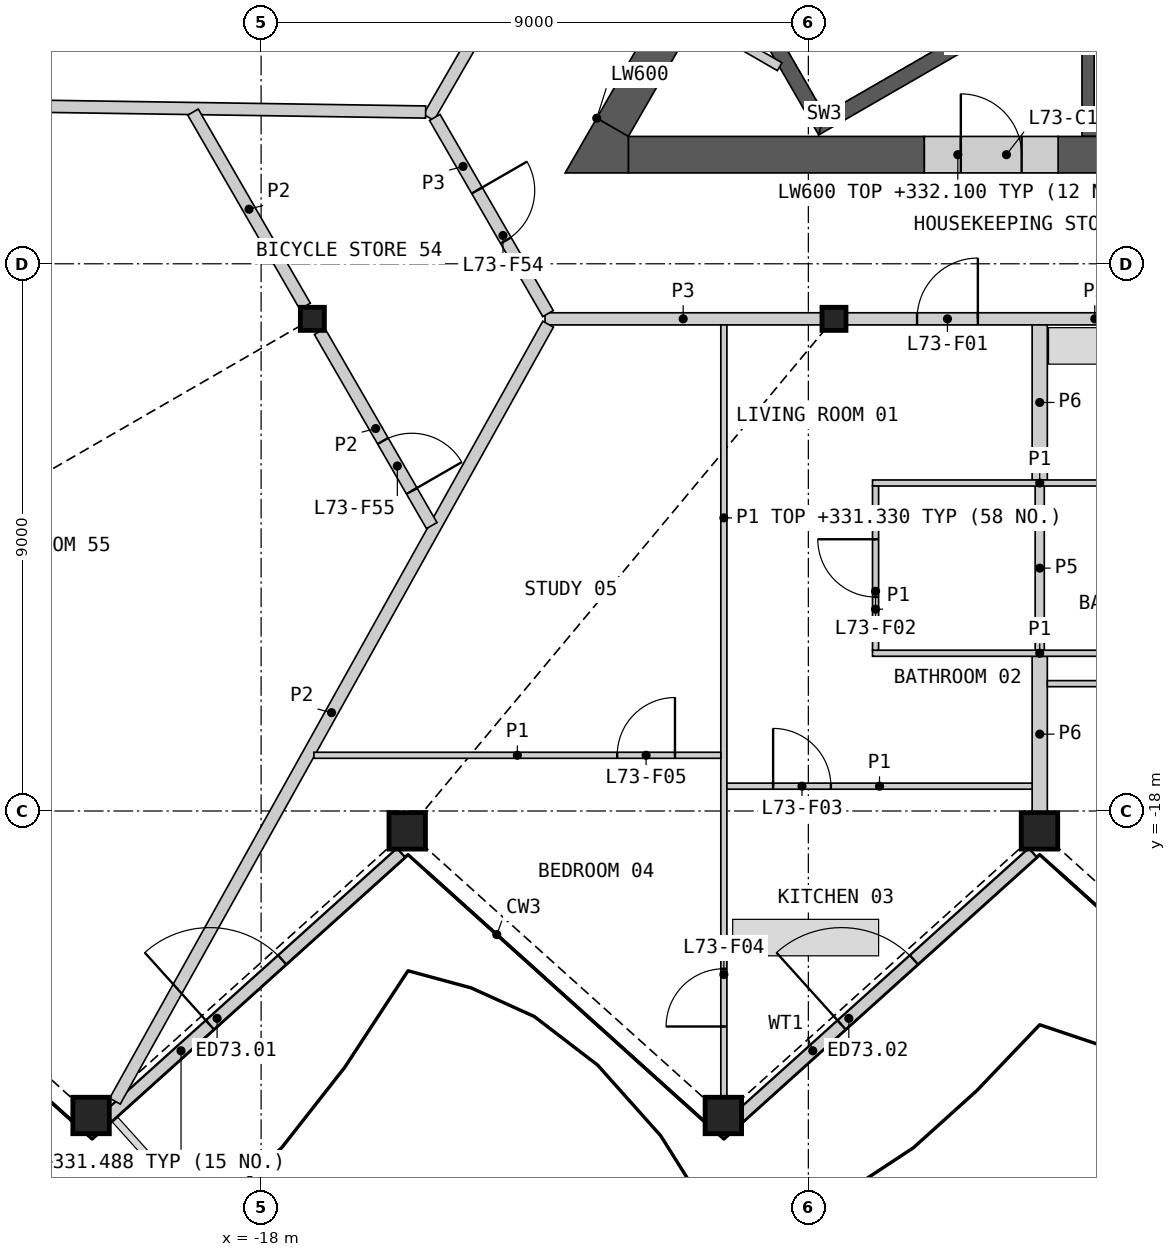
"""IFC4 building model, lengths in metres.
Left out: names, types, materials, properties, quantities, classifications, styles, units other than length and angle.
Written with IfcOpenShell. Run it as: python <this file> out.ifc"""

import sys

from ifc_helpers import new_model, si_unit, direction, frame, frame_2d, origin, origin_2d, place, context, subcontext, project, spatial, polyline, rectangle, hollow_rectangle, i_section, outline, extrude, element, fill, save


model = new_model("IFC4")
c1 = context("Model", 3, precision=1e-05, world=origin(), true_north=direction((0.0, 1.0)))
c2 = subcontext(c1, "Body", "Model", "MODEL_VIEW")
j1 = project(units=[si_unit("LENGTHUNIT", "METRE"), si_unit("PLANEANGLEUNIT", "RADIAN")], contexts=[c1])
p1 = place(None, origin())
s1 = spatial("IfcSite", under=j1, at=p1, CompositionType="ELEMENT")
p2 = place(p1, origin())
s2 = spatial("IfcBuilding", under=s1, at=p2, CompositionType="ELEMENT")
p3 = place(p2, frame((0.0, 0.0, 329.0)))
s3 = spatial("IfcBuildingStorey", under=s2, at=p3, CompositionType="ELEMENT", Elevation=329.0)
for number, where, z_axis, x_axis in (
    (1, (-20.796, -23.008, 0.0), (0.0, 0.0, 1.0), (1.0, 0.0, 0.0)),
    (2, (-15.597, -18.327, 0.0), (0.0, 0.0, 1.0), (1.0, 0.0, 0.0)),
    (3, (-10.398, -23.008, 0.0), (0.0, 0.0, 1.0), (1.0, 0.0, 0.0)),
    (4, (-5.199, -18.327, 0.0), (0.0, 0.0, 1.0), (1.0, 0.0, 0.0)),
):
    element("IfcColumn", number, at=place(p3, frame(where, z_axis=z_axis, x_axis=x_axis)), inside=s3, PredefinedType="COLUMN", context=c2, shape_type="SweptSolid", body=[
        extrude(hollow_rectangle(XDim=0.6, YDim=0.6, WallThickness=0.04, at=origin_2d()), origin(), (0.0, 0.0, 1.0), 3.4),
    ])
for number, where, z_axis, x_axis in (
    (5, (-17.157, -9.906, 0.0), (0.0, 0.0, 1.0), (1.0, 0.0, 0.0)),
    (6, (-8.578, -9.906, 0.0), (0.0, 0.0, 1.0), (1.0, 0.0, 0.0)),
):
    element("IfcColumn", number, at=place(p3, frame(where, z_axis=z_axis, x_axis=x_axis)), inside=s3, PredefinedType="COLUMN", context=c2, shape_type="SweptSolid", body=[
        extrude(i_section(OverallWidth=0.396, OverallDepth=0.381, WebThickness=0.019, FlangeThickness=0.03, at=origin_2d()), origin(), (0.0, 0.0, 1.0), 3.4),
    ])
p4 = place(p3, frame((-20.523, -23.031, 0.0), z_axis=(0.0, 0.0, 1.0), x_axis=(0.743138937876, 0.669137145145, 0.0)))
e7 = element("IfcWall", 7, at=p4, inside=s3, PredefinedType="SOLIDWALL", context=c2, shape_type="SweptSolid", body=[
    extrude(rectangle(XDim=6.493, YDim=0.2, at=frame_2d((3.246, 0.0))), origin(), (0.0, 0.0, 1.0), 2.488),
])
p5 = place(p4, frame((2.261, 0.0, 0.0)))
e8 = element("IfcOpeningElement", 8, at=p5, cuts=e7, PredefinedType="OPENING", context=c2, shape_type="SweptSolid", body=[
    extrude(rectangle(XDim=1.6, YDim=2.25, at=frame_2d((0.8, 1.125))), frame((0.0, 0.11, 0.0), z_axis=(0.0, -1.0, 0.0), x_axis=(1.0, 0.0, 0.0)), (0.0, 0.0, 1.0), 0.22),
])
p6 = place(p3, frame((-10.134, -23.031, 0.0), z_axis=(0.0, 0.0, 1.0), x_axis=(0.743138937876, 0.669137145145, 0.0)))
e9 = element("IfcWall", 9, at=p6, inside=s3, PredefinedType="SOLIDWALL", context=c2, shape_type="SweptSolid", body=[
    extrude(rectangle(XDim=6.493, YDim=0.2, at=frame_2d((3.246, 0.0))), origin(), (0.0, 0.0, 1.0), 2.488),
])
p7 = place(p6, frame((2.261, 0.0, 0.0)))
e10 = element("IfcOpeningElement", 10, at=p7, cuts=e9, PredefinedType="OPENING", context=c2, shape_type="SweptSolid", body=[
    extrude(rectangle(XDim=1.6, YDim=2.25, at=frame_2d((0.8, 1.125))), frame((0.0, 0.11, 0.0), z_axis=(0.0, -1.0, 0.0), x_axis=(1.0, 0.0, 0.0)), (0.0, 0.0, 1.0), 0.22),
])
p8 = place(p3, origin())
e11 = element("IfcWall", 11, at=p8, inside=s3, PredefinedType="SHEAR", context=c2, shape_type="SweptSolid", body=[
    extrude(outline(polyline([(4.5, -4.4), (4.5, -6.906), (-4.5, -6.906), (-4.5, -4.4), (-4.3, -4.4), (-4.3, -6.7), (-2.3, -6.7), (-2.3, -4.4), (-2.1, -4.4), (-2.1, -6.7), (-0.1, -6.7), (-0.1, -4.4), (0.1, -4.4), (0.1, -6.7), (2.1, -6.7), (2.1, -4.4), (2.3, -4.4), (2.3, -6.7), (4.3, -6.7), (4.3, -4.4), (4.5, -4.4)])), origin(), (0.0, 0.0, 1.0), 3.1),
])
p9 = place(p3, origin())
e12 = element("IfcWall", 12, at=p9, inside=s3, PredefinedType="SHEAR", context=c2, shape_type="SweptSolid", body=[
    extrude(outline(polyline([(-10.374, -4.206), (-8.83, -6.881), (-8.738, -6.539), (-10.032, -4.298), (-10.374, -4.206)])), origin(), (0.0, 0.0, 1.0), 3.1),
])
p10 = place(p3, origin())
e13 = element("IfcWall", 13, at=p10, inside=s3, PredefinedType="SHEAR", context=c2, shape_type="SweptSolid", body=[
    extrude(outline(polyline([(-8.738, -6.539), (-8.83, -6.881), (-3.763, -3.956), (-3.888, -3.739), (-8.738, -6.539)])), origin(), (0.0, 0.0, 1.0), 3.1),
])
p11 = place(p3, frame((-10.842, -4.967, 0.0), z_axis=(0.0, 0.0, 1.0), x_axis=(0.866098216386, -0.499873863663, 0.0)))
e14 = element("IfcWall", 14, at=p11, inside=s3, PredefinedType="PARTITIONING", context=c2, shape_type="SweptSolid", body=[
    extrude(rectangle(XDim=1.582, YDim=0.15, at=frame_2d((0.791, 0.0))), origin(), (0.0, 0.0, 1.0), 3.1),
])
p12 = place(p3, frame((-4.892, -7.206, 0.0), z_axis=(0.0, 0.0, 1.0), x_axis=(1.0, 0.0, 0.0)))
e15 = element("IfcWall", 15, at=p12, inside=s3, PredefinedType="SHEAR", context=c2, shape_type="SweptSolid", body=[
    extrude(rectangle(XDim=16.853, YDim=0.6, at=frame_2d((8.426, 0.0))), origin(), (0.0, 0.0, 1.0), 3.1),
])
p13 = place(p3, frame((-11.961, -7.206, 0.0), z_axis=(0.0, 0.0, 1.0), x_axis=(1.0, 0.0, 0.0)))
e16 = element("IfcWall", 16, at=p13, inside=s3, PredefinedType="SHEAR", context=c2, shape_type="SweptSolid", body=[
    extrude(rectangle(XDim=4.868, YDim=0.6, at=frame_2d((2.434, 0.0))), origin(), (0.0, 0.0, 1.0), 3.1),
])
p14 = place(p3, frame((-9.941, -2.807, 0.0), z_axis=(0.0, 0.0, 1.0), x_axis=(-0.500020646047, -0.866013483456, 0.0)))
e17 = element("IfcWall", 17, at=p14, inside=s3, PredefinedType="SHEAR", context=c2, shape_type="SweptSolid", body=[
    extrude(rectangle(XDim=4.559, YDim=0.6, at=frame_2d((2.28, 0.0))), origin(), (0.0, 0.0, 1.0), 3.1),
])
p15 = place(p3, origin())
e18 = element("IfcWall", 18, at=p15, inside=s3, PredefinedType="SHEAR", context=c2, shape_type="SweptSolid", body=[
    extrude(outline(polyline([(-12.48, -6.606), (-11.961, -6.906), (-11.961, -7.506), (-13.0, -7.506), (-12.48, -6.606)])), origin(), (0.0, 0.0, 1.0), 3.1),
])
p16 = place(p3, frame((-7.092, -7.206, 0.0), z_axis=(0.0, 0.0, 1.0), x_axis=(1.0, 0.0, 0.0)))
e19 = element("IfcWall", 19, at=p16, inside=s3, PredefinedType="SHEAR", context=c2, shape_type="SweptSolid", body=[
    extrude(rectangle(XDim=2.2, YDim=0.6, at=frame_2d((1.1, 0.0))), origin(), (0.0, 0.0, 1.0), 3.1),
])
p17 = place(p16, frame((0.6, 0.0, 0.0)))
e20 = element("IfcOpeningElement", 20, at=p17, cuts=e19, PredefinedType="OPENING", context=c2, shape_type="SweptSolid", body=[
    extrude(rectangle(XDim=1.0, YDim=2.1, at=frame_2d((0.5, 1.05))), frame((0.0, 0.31, 0.0), z_axis=(0.0, -1.0, 0.0), x_axis=(1.0, 0.0, 0.0)), (0.0, 0.0, 1.0), 0.62),
])
p18 = place(p3, frame((-8.371, -9.906, 0.0), z_axis=(0.0, 0.0, 1.0), x_axis=(1.0, 0.0, 0.0)))
e21 = element("IfcWall", 21, at=p18, inside=s3, PredefinedType="PARTITIONING", context=c2, shape_type="SweptSolid", body=[
    extrude(rectangle(XDim=8.163, YDim=0.2, at=frame_2d((4.082, 0.0))), origin(), (0.0, 0.0, 1.0), 3.1),
])
p19 = place(p18, frame((1.159, 0.0, 0.0)))
e22 = element("IfcOpeningElement", 22, at=p19, cuts=e21, PredefinedType="OPENING", context=c2, shape_type="SweptSolid", body=[
    extrude(rectangle(XDim=1.0, YDim=2.1, at=frame_2d((0.5, 1.05))), frame((0.0, 0.11, 0.0), z_axis=(0.0, -1.0, 0.0), x_axis=(1.0, 0.0, 0.0)), (0.0, 0.0, 1.0), 0.22),
])
p20 = place(p18, frame((6.327, 0.0, 0.0)))
e23 = element("IfcOpeningElement", 23, at=p20, cuts=e21, PredefinedType="OPENING", context=c2, shape_type="SweptSolid", body=[
    extrude(rectangle(XDim=1.0, YDim=2.1, at=frame_2d((0.5, 1.05))), frame((0.0, 0.11, 0.0), z_axis=(0.0, -1.0, 0.0), x_axis=(1.0, 0.0, 0.0)), (0.0, 0.0, 1.0), 0.22),
])
p21 = place(p3, frame((-13.331, -9.906, 0.0), z_axis=(0.0, 0.0, 1.0), x_axis=(1.0, 0.0, 0.0)))
e24 = element("IfcWall", 24, at=p21, inside=s3, PredefinedType="PARTITIONING", context=c2, shape_type="SweptSolid", body=[
    extrude(rectangle(XDim=4.545, YDim=0.2, at=frame_2d((2.272, 0.0))), origin(), (0.0, 0.0, 1.0), 3.1),
])
p22 = place(p3, frame((-15.244, -6.592, 0.0), z_axis=(0.0, 0.0, 1.0), x_axis=(0.49999094734, 0.866030630277, 0.0)))
e25 = element("IfcWall", 25, at=p22, inside=s3, PredefinedType="PARTITIONING", context=c2, shape_type="SweptSolid", body=[
    extrude(rectangle(XDim=4.513, YDim=0.2, at=frame_2d((2.256, 0.0))), origin(), (0.0, 0.0, 1.0), 3.1),
])
p23 = place(p3, frame((-15.144, -6.592, 0.0), z_axis=(0.0, 0.0, 1.0), x_axis=(0.499958791762, -0.866049194065, 0.0)))
e26 = element("IfcWall", 26, at=p23, inside=s3, PredefinedType="PARTITIONING", context=c2, shape_type="SweptSolid", body=[
    extrude(rectangle(XDim=3.726, YDim=0.2, at=frame_2d((1.863, 0.0))), origin(), (0.0, 0.0, 1.0), 3.1),
])
p24 = place(p23, frame((1.388, 0.0, 0.0)))
e27 = element("IfcOpeningElement", 27, at=p24, cuts=e26, PredefinedType="OPENING", context=c2, shape_type="SweptSolid", body=[
    extrude(rectangle(XDim=0.95, YDim=2.1, at=frame_2d((0.475, 1.05))), frame((0.0, 0.11, 0.0), z_axis=(0.0, -1.0, 0.0), x_axis=(1.0, 0.0, 0.0)), (0.0, 0.0, 1.0), 0.22),
])
p25 = place(p3, frame((-5.195, -12.556, 0.0), z_axis=(0.0, 0.0, 1.0), x_axis=(0.0, 1.0, 0.0)))
e28 = element("IfcWall", 28, at=p25, inside=s3, PredefinedType="PARTITIONING", context=c2, shape_type="SweptSolid", body=[
    extrude(rectangle(XDim=2.55, YDim=0.25, at=frame_2d((1.275, 0.0))), origin(), (0.0, 0.0, 1.0), 2.33),
])
p26 = place(p3, frame((-5.195, -18.017, 0.0), z_axis=(0.0, 0.0, 1.0), x_axis=(0.0, 1.0, 0.0)))
e29 = element("IfcWall", 29, at=p26, inside=s3, PredefinedType="PARTITIONING", context=c2, shape_type="SweptSolid", body=[
    extrude(rectangle(XDim=2.561, YDim=0.25, at=frame_2d((1.281, 0.0))), origin(), (0.0, 0.0, 1.0), 2.33),
])
p27 = place(p3, frame((-20.404, -22.772, 0.0), z_axis=(0.0, 0.0, 1.0), x_axis=(0.486917529285, 0.873447949036, 0.0)))
e30 = element("IfcWall", 30, at=p27, inside=s3, PredefinedType="PARTITIONING", context=c2, shape_type="SweptSolid", body=[
    extrude(rectangle(XDim=14.631, YDim=0.2, at=frame_2d((7.315, 0.0))), origin(), (0.0, 0.0, 1.0), 2.33),
])
p28 = place(p3, frame((-30.014, -6.282, 0.0), z_axis=(0.0, 0.0, 1.0), x_axis=(0.99988686643, -0.015041753265, 0.0)))
e31 = element("IfcWall", 31, at=p28, inside=s3, PredefinedType="PARTITIONING", context=c2, shape_type="SweptSolid", body=[
    extrude(rectangle(XDim=14.721, YDim=0.2, at=frame_2d((7.361, 0.0))), origin(), (0.0, 0.0, 1.0), 2.33),
])
p29 = place(p3, frame((-17.037, -10.113, 0.0), z_axis=(0.0, 0.0, 1.0), x_axis=(0.50002820729, -0.866009117685, 0.0)))
e32 = element("IfcWall", 32, at=p29, inside=s3, PredefinedType="PARTITIONING", context=c2, shape_type="SweptSolid", body=[
    extrude(rectangle(XDim=3.686, YDim=0.2, at=frame_2d((1.843, 0.0))), origin(), (0.0, 0.0, 1.0), 2.33),
])
p30 = place(p29, frame((2.08, 0.0, 0.0)))
e33 = element("IfcOpeningElement", 33, at=p30, cuts=e32, PredefinedType="OPENING", context=c2, shape_type="SweptSolid", body=[
    extrude(rectangle(XDim=0.95, YDim=2.1, at=frame_2d((0.475, 1.05))), frame((0.0, 0.11, 0.0), z_axis=(0.0, -1.0, 0.0), x_axis=(1.0, 0.0, 0.0)), (0.0, 0.0, 1.0), 0.22),
])
p31 = place(p3, frame((-19.12, -6.506, 0.0), z_axis=(0.0, 0.0, 1.0), x_axis=(0.499978535015, -0.866037796245, 0.0)))
e34 = element("IfcWall", 34, at=p31, inside=s3, PredefinedType="PARTITIONING", context=c2, shape_type="SweptSolid", body=[
    extrude(rectangle(XDim=3.686, YDim=0.2, at=frame_2d((1.843, 0.0))), origin(), (0.0, 0.0, 1.0), 2.33),
])
p32 = place(p3, frame((-5.195, -15.356, 0.0), z_axis=(0.0, 0.0, 1.0), x_axis=(0.0, 1.0, 0.0)))
e35 = element("IfcWall", 35, at=p32, inside=s3, PredefinedType="PLUMBINGWALL", context=c2, shape_type="SweptSolid", body=[
    extrude(rectangle(XDim=2.7, YDim=0.15, at=frame_2d((1.35, 0.0))), origin(), (0.0, 0.0, 1.0), 2.33),
])
p33 = place(p3, frame((-10.389, -22.698, 0.0), z_axis=(0.0, 0.0, 1.0), x_axis=(0.0, 1.0, 0.0)))
e36 = element("IfcWall", 36, at=p33, inside=s3, PredefinedType="PARTITIONING", context=c2, shape_type="SweptSolid", body=[
    extrude(rectangle(XDim=12.692, YDim=0.1, at=frame_2d((6.346, 0.0))), origin(), (0.0, 0.0, 1.0), 2.33),
])
p34 = place(p33, frame((1.153, 0.0, 0.0)))
e37 = element("IfcOpeningElement", 37, at=p34, cuts=e36, PredefinedType="OPENING", context=c2, shape_type="SweptSolid", body=[
    extrude(rectangle(XDim=0.95, YDim=2.1, at=frame_2d((0.475, 1.05))), frame((0.0, 0.06, 0.0), z_axis=(0.0, -1.0, 0.0), x_axis=(1.0, 0.0, 0.0)), (0.0, 0.0, 1.0), 0.12),
])
p35 = place(p3, frame((-23.361, -6.295, 0.0), z_axis=(0.0, 0.0, 1.0), x_axis=(0.499987686533, 0.866032512851, 0.0)))
e38 = element("IfcWall", 38, at=p35, inside=s3, PredefinedType="PARTITIONING", context=c2, shape_type="SweptSolid", body=[
    extrude(rectangle(XDim=6.693, YDim=0.1, at=frame_2d((3.347, 0.0))), origin(), (0.0, 0.0, 1.0), 2.33),
])
p36 = place(p35, frame((3.275, 0.0, 0.0)))
e39 = element("IfcOpeningElement", 39, at=p36, cuts=e38, PredefinedType="OPENING", context=c2, shape_type="SweptSolid", body=[
    extrude(rectangle(XDim=0.95, YDim=2.1, at=frame_2d((0.475, 1.05))), frame((0.0, 0.06, 0.0), z_axis=(0.0, -1.0, 0.0), x_axis=(1.0, 0.0, 0.0)), (0.0, 0.0, 1.0), 0.12),
])
p37 = place(p3, frame((-17.132, -17.084, 0.0), z_axis=(0.0, 0.0, 1.0), x_axis=(1.0, 0.0, 0.0)))
e40 = element("IfcWall", 40, at=p37, inside=s3, PredefinedType="PARTITIONING", context=c2, shape_type="SweptSolid", body=[
    extrude(rectangle(XDim=6.693, YDim=0.1, at=frame_2d((3.346, 0.0))), origin(), (0.0, 0.0, 1.0), 2.33),
])
p38 = place(p37, frame((4.989, 0.0, 0.0)))
e41 = element("IfcOpeningElement", 41, at=p38, cuts=e40, PredefinedType="OPENING", context=c2, shape_type="SweptSolid", body=[
    extrude(rectangle(XDim=0.95, YDim=2.1, at=frame_2d((0.475, 1.05))), frame((0.0, 0.06, 0.0), z_axis=(0.0, -1.0, 0.0), x_axis=(1.0, 0.0, 0.0)), (0.0, 0.0, 1.0), 0.12),
])
p39 = place(p3, frame((-7.945, -12.606, 0.0), z_axis=(0.0, 0.0, 1.0), x_axis=(1.0, 0.0, 0.0)))
e42 = element("IfcWall", 42, at=p39, inside=s3, PredefinedType="PARTITIONING", context=c2, shape_type="SweptSolid", body=[
    extrude(rectangle(XDim=5.5, YDim=0.1, at=frame_2d((2.75, 0.0))), origin(), (0.0, 0.0, 1.0), 2.33),
])
p40 = place(p39, frame((4.3, 0.0, 0.0)))
e43 = element("IfcOpeningElement", 43, at=p40, cuts=e42, PredefinedType="OPENING", context=c2, shape_type="SweptSolid", body=[
    extrude(rectangle(XDim=0.95, YDim=2.1, at=frame_2d((0.475, 1.05))), frame((0.0, 0.06, 0.0), z_axis=(0.0, -1.0, 0.0), x_axis=(1.0, 0.0, 0.0)), (0.0, 0.0, 1.0), 0.12),
])
p41 = place(p3, frame((-7.945, -15.406, 0.0), z_axis=(0.0, 0.0, 1.0), x_axis=(1.0, 0.0, 0.0)))
e44 = element("IfcWall", 44, at=p41, inside=s3, PredefinedType="PARTITIONING", context=c2, shape_type="SweptSolid", body=[
    extrude(rectangle(XDim=5.5, YDim=0.1, at=frame_2d((2.75, 0.0))), origin(), (0.0, 0.0, 1.0), 2.33),
])
p42 = place(p3, frame((-10.339, -17.592, 0.0), z_axis=(0.0, 0.0, 1.0), x_axis=(1.0, 0.0, 0.0)))
e45 = element("IfcWall", 45, at=p42, inside=s3, PredefinedType="PARTITIONING", context=c2, shape_type="SweptSolid", body=[
    extrude(rectangle(XDim=5.02, YDim=0.1, at=frame_2d((2.51, 0.0))), origin(), (0.0, 0.0, 1.0), 2.33),
])
p43 = place(p42, frame((0.76, 0.0, 0.0)))
e46 = element("IfcOpeningElement", 46, at=p43, cuts=e45, PredefinedType="OPENING", context=c2, shape_type="SweptSolid", body=[
    extrude(rectangle(XDim=0.95, YDim=2.1, at=frame_2d((0.475, 1.05))), frame((0.0, 0.06, 0.0), z_axis=(0.0, -1.0, 0.0), x_axis=(1.0, 0.0, 0.0)), (0.0, 0.0, 1.0), 0.12),
])
p44 = place(p3, frame((-5.07, -15.906, 0.0), z_axis=(0.0, 0.0, 1.0), x_axis=(1.0, 0.0, 0.0)))
e47 = element("IfcWall", 47, at=p44, inside=s3, PredefinedType="PARTITIONING", context=c2, shape_type="SweptSolid", body=[
    extrude(rectangle(XDim=2.825, YDim=0.1, at=frame_2d((1.413, 0.0))), origin(), (0.0, 0.0, 1.0), 2.33),
])
p45 = place(p44, frame((1.625, 0.0, 0.0)))
e48 = element("IfcOpeningElement", 48, at=p45, cuts=e47, PredefinedType="OPENING", context=c2, shape_type="SweptSolid", body=[
    extrude(rectangle(XDim=0.95, YDim=2.1, at=frame_2d((0.475, 1.05))), frame((0.0, 0.06, 0.0), z_axis=(0.0, -1.0, 0.0), x_axis=(1.0, 0.0, 0.0)), (0.0, 0.0, 1.0), 0.12),
])
p46 = place(p3, frame((-7.895, -15.356, 0.0), z_axis=(0.0, 0.0, 1.0), x_axis=(0.0, 1.0, 0.0)))
e49 = element("IfcWall", 49, at=p46, inside=s3, PredefinedType="PARTITIONING", context=c2, shape_type="SweptSolid", body=[
    extrude(rectangle(XDim=2.7, YDim=0.1, at=frame_2d((1.35, 0.0))), origin(), (0.0, 0.0, 1.0), 2.33),
])
p47 = place(p46, frame((0.875, 0.0, 0.0)))
e50 = element("IfcOpeningElement", 50, at=p47, cuts=e49, PredefinedType="OPENING", context=c2, shape_type="SweptSolid", body=[
    extrude(rectangle(XDim=0.95, YDim=2.1, at=frame_2d((0.475, 1.05))), frame((0.0, 0.06, 0.0), z_axis=(0.0, -1.0, 0.0), x_axis=(1.0, 0.0, 0.0)), (0.0, 0.0, 1.0), 0.12),
])
p48 = place(p5, origin())
e51 = element("IfcDoor", 51, at=p48, inside=s3, OperationType="DOUBLE_DOOR_SINGLE_SWING", PredefinedType="DOOR", context=c2, shape_type="SweptSolid", body=[
    extrude(rectangle(XDim=1.6, YDim=2.25, at=frame_2d((0.8, 1.125))), frame((0.0, 0.025, 0.0), z_axis=(0.0, -1.0, 0.0), x_axis=(1.0, 0.0, 0.0)), (0.0, 0.0, 1.0), 0.05),
])
fill(e8, e51)
p49 = place(p7, origin())
e52 = element("IfcDoor", 52, at=p49, inside=s3, OperationType="DOUBLE_DOOR_SINGLE_SWING", PredefinedType="DOOR", context=c2, shape_type="SweptSolid", body=[
    extrude(rectangle(XDim=1.6, YDim=2.25, at=frame_2d((0.8, 1.125))), frame((0.0, 0.025, 0.0), z_axis=(0.0, -1.0, 0.0), x_axis=(1.0, 0.0, 0.0)), (0.0, 0.0, 1.0), 0.05),
])
fill(e10, e52)
p50 = place(p17, origin())
e53 = element("IfcDoor", 53, at=p50, inside=s3, OperationType="SINGLE_SWING_LEFT", PredefinedType="DOOR", context=c2, shape_type="SweptSolid", body=[
    extrude(rectangle(XDim=1.0, YDim=2.1, at=frame_2d((0.5, 1.05))), frame((0.0, 0.055, 0.0), z_axis=(0.0, -1.0, 0.0), x_axis=(1.0, 0.0, 0.0)), (0.0, 0.0, 1.0), 0.05),
])
fill(e20, e53)
p51 = place(p19, origin())
e54 = element("IfcDoor", 54, at=p51, inside=s3, OperationType="SINGLE_SWING_RIGHT", PredefinedType="DOOR", context=c2, shape_type="SweptSolid", body=[
    extrude(rectangle(XDim=1.0, YDim=2.1, at=frame_2d((0.5, 1.05))), frame((0.0, 0.025, 0.0), z_axis=(0.0, -1.0, 0.0), x_axis=(1.0, 0.0, 0.0)), (0.0, 0.0, 1.0), 0.05),
])
fill(e22, e54)
p52 = place(p47, origin())
e55 = element("IfcDoor", 55, at=p52, inside=s3, OperationType="SINGLE_SWING_RIGHT", PredefinedType="DOOR", context=c2, shape_type="SweptSolid", body=[
    extrude(rectangle(XDim=0.95, YDim=2.1, at=frame_2d((0.475, 1.05))), frame((0.0, 0.025, 0.0), z_axis=(0.0, -1.0, 0.0), x_axis=(1.0, 0.0, 0.0)), (0.0, 0.0, 1.0), 0.05),
])
fill(e50, e55)
p53 = place(p43, origin())
e56 = element("IfcDoor", 56, at=p53, inside=s3, OperationType="SINGLE_SWING_LEFT", PredefinedType="DOOR", context=c2, shape_type="SweptSolid", body=[
    extrude(rectangle(XDim=0.95, YDim=2.1, at=frame_2d((0.475, 1.05))), frame((0.0, 0.025, 0.0), z_axis=(0.0, -1.0, 0.0), x_axis=(1.0, 0.0, 0.0)), (0.0, 0.0, 1.0), 0.05),
])
fill(e46, e56)
p54 = place(p34, origin())
e57 = element("IfcDoor", 57, at=p54, inside=s3, OperationType="SINGLE_SWING_LEFT", PredefinedType="DOOR", context=c2, shape_type="SweptSolid", body=[
    extrude(rectangle(XDim=0.95, YDim=2.1, at=frame_2d((0.475, 1.05))), frame((0.0, 0.025, 0.0), z_axis=(0.0, -1.0, 0.0), x_axis=(1.0, 0.0, 0.0)), (0.0, 0.0, 1.0), 0.05),
])
fill(e37, e57)
p55 = place(p38, origin())
e58 = element("IfcDoor", 58, at=p55, inside=s3, OperationType="SINGLE_SWING_RIGHT", PredefinedType="DOOR", context=c2, shape_type="SweptSolid", body=[
    extrude(rectangle(XDim=0.95, YDim=2.1, at=frame_2d((0.475, 1.05))), frame((0.0, 0.025, 0.0), z_axis=(0.0, -1.0, 0.0), x_axis=(1.0, 0.0, 0.0)), (0.0, 0.0, 1.0), 0.05),
])
fill(e41, e58)
p56 = place(p24, origin())
e59 = element("IfcDoor", 59, at=p56, inside=s3, OperationType="SINGLE_SWING_LEFT", PredefinedType="DOOR", context=c2, shape_type="SweptSolid", body=[
    extrude(rectangle(XDim=0.95, YDim=2.1, at=frame_2d((0.475, 1.05))), frame((0.0, 0.025, 0.0), z_axis=(0.0, -1.0, 0.0), x_axis=(1.0, 0.0, 0.0)), (0.0, 0.0, 1.0), 0.05),
])
fill(e27, e59)
p57 = place(p30, origin())
e60 = element("IfcDoor", 60, at=p57, inside=s3, OperationType="SINGLE_SWING_RIGHT", PredefinedType="DOOR", context=c2, shape_type="SweptSolid", body=[
    extrude(rectangle(XDim=0.95, YDim=2.1, at=frame_2d((0.475, 1.05))), frame((0.0, 0.025, 0.0), z_axis=(0.0, -1.0, 0.0), x_axis=(1.0, 0.0, 0.0)), (0.0, 0.0, 1.0), 0.05),
])
fill(e33, e60)
save(model, sys.argv[1])
